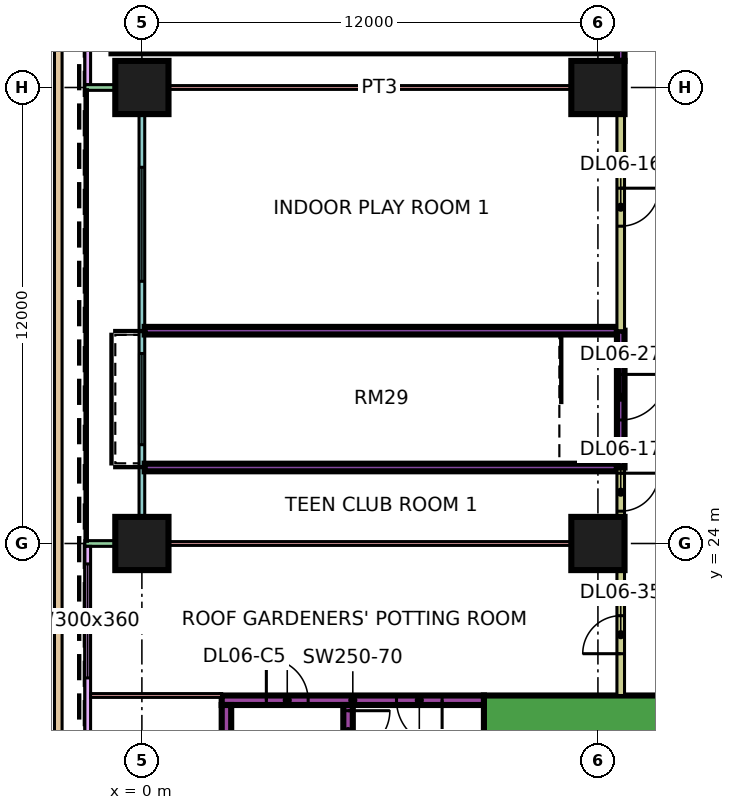
"""IFC4 building model, lengths in metres.
Left out: names, types, materials, properties, quantities, classifications, styles, units other than length and angle.
Written with IfcOpenShell. Run it as: python <this file> out.ifc"""

import sys

from ifc_helpers import new_model, si_unit, direction, frame, frame_2d, origin, origin_2d, place, context, subcontext, project, spatial, rectangle, extrude, element, fill, save


model = new_model("IFC4")
c1 = context("Model", 3, precision=1e-05, world=origin(), true_north=direction((0.0, 1.0)))
c2 = subcontext(c1, "Body", "Model", "MODEL_VIEW")
j1 = project(units=[si_unit("LENGTHUNIT", "METRE"), si_unit("PLANEANGLEUNIT", "RADIAN")], contexts=[c1])
p1 = place(None, origin())
s1 = spatial("IfcSite", under=j1, at=p1, CompositionType="ELEMENT")
p2 = place(p1, origin())
s2 = spatial("IfcBuilding", under=s1, at=p2, CompositionType="ELEMENT")
p3 = place(p2, frame((0.0, 0.0, 35.4)))
s3 = spatial("IfcBuildingStorey", under=s2, at=p3, CompositionType="ELEMENT", Elevation=35.4)
p4 = place(p3, frame((0.0, 24.0, 0.0), z_axis=(0.0, 0.0, 1.0), x_axis=(1.0, 0.0, 0.0)))
e1 = element("IfcColumn", 1, at=p4, inside=s3, PredefinedType="COLUMN", context=c2, shape_type="SweptSolid", body=[
    extrude(rectangle(XDim=1.4, YDim=1.4, at=origin_2d()), origin(), (0.0, 0.0, 1.0), 6.0),
])
p5 = place(p3, frame((0.0, 36.0, 0.0), z_axis=(0.0, 0.0, 1.0), x_axis=(1.0, 0.0, 0.0)))
e2 = element("IfcColumn", 2, at=p5, inside=s3, PredefinedType="COLUMN", context=c2, shape_type="SweptSolid", body=[
    extrude(rectangle(XDim=1.4, YDim=1.4, at=origin_2d()), origin(), (0.0, 0.0, 1.0), 6.0),
])
for number, where, z_axis, x_axis in (
    (3, (12.0, 24.0, 0.0), (0.0, 0.0, 1.0), (1.0, 0.0, 0.0)),
    (4, (12.0, 36.0, 0.0), (0.0, 0.0, 1.0), (1.0, 0.0, 0.0)),
):
    element("IfcColumn", number, at=place(p3, frame(where, z_axis=z_axis, x_axis=x_axis)), inside=s3, PredefinedType="COLUMN", context=c2, shape_type="SweptSolid", body=[
        extrude(rectangle(XDim=1.4, YDim=1.4, at=origin_2d()), origin(), (0.0, 0.0, 1.0), 6.0),
    ])
p6 = place(p3, frame((9.0, 19.4, 0.0), z_axis=(0.0, 0.0, 1.0), x_axis=(1.0, 0.0, 0.0)))
e5 = element("IfcWall", 5, at=p6, inside=s3, PredefinedType="SHEAR", context=c2, shape_type="SweptSolid", body=[
    extrude(rectangle(XDim=25.0, YDim=1.2, at=frame_2d((12.5, 0.0))), origin(), (0.0, 0.0, 1.0), 6.0),
])
p7 = place(p6, frame((19.1, 0.0, 0.0)))
e6 = element("IfcOpeningElement", 6, at=p7, cuts=e5, PredefinedType="OPENING", context=c2, shape_type="SweptSolid", body=[
    extrude(rectangle(XDim=1.8, YDim=2.4, at=frame_2d((0.9, 1.2))), frame((0.0, 0.61, 0.0), z_axis=(0.0, -1.0, 0.0), x_axis=(1.0, 0.0, 0.0)), (0.0, 0.0, 1.0), 1.22),
])
p8 = place(p3, frame((2.1, 19.875, 0.0), z_axis=(0.0, 0.0, 1.0), x_axis=(1.0, 0.0, 0.0)))
e7 = element("IfcWall", 7, at=p8, inside=s3, PredefinedType="SHEAR", context=c2, shape_type="SweptSolid", body=[
    extrude(rectangle(XDim=6.9, YDim=0.25, at=frame_2d((3.45, 0.0))), origin(), (0.0, 0.0, 1.0), 6.0),
])
p9 = place(p8, frame((1.175, 0.0, 0.0)))
e8 = element("IfcOpeningElement", 8, at=p9, cuts=e7, PredefinedType="OPENING", context=c2, shape_type="SweptSolid", body=[
    extrude(rectangle(XDim=1.1, YDim=2.2, at=frame_2d((0.55, 1.1))), frame((0.0, 0.135, 0.0), z_axis=(0.0, -1.0, 0.0), x_axis=(1.0, 0.0, 0.0)), (0.0, 0.0, 1.0), 0.27),
])
p10 = place(p8, frame((4.6, 0.0, 0.0)))
e9 = element("IfcOpeningElement", 9, at=p10, cuts=e7, PredefinedType="OPENING", context=c2, shape_type="SweptSolid", body=[
    extrude(rectangle(XDim=1.2, YDim=2.2, at=frame_2d((0.6, 1.1))), frame((0.0, 0.135, 0.0), z_axis=(0.0, -1.0, 0.0), x_axis=(1.0, 0.0, 0.0)), (0.0, 0.0, 1.0), 0.27),
])
p11 = place(p3, frame((2.225, 13.25, 0.0), z_axis=(0.0, 0.0, 1.0), x_axis=(0.0, 1.0, 0.0)))
e10 = element("IfcWall", 10, at=p11, inside=s3, PredefinedType="SHEAR", context=c2, shape_type="SweptSolid", body=[
    extrude(rectangle(XDim=6.5, YDim=0.25, at=frame_2d((3.25, 0.0))), origin(), (0.0, 0.0, 1.0), 6.0),
])
p12 = place(p3, frame((5.425, 13.25, 0.0), z_axis=(0.0, 0.0, 1.0), x_axis=(0.0, 1.0, 0.0)))
e11 = element("IfcWall", 11, at=p12, inside=s3, PredefinedType="SHEAR", context=c2, shape_type="SweptSolid", body=[
    extrude(rectangle(XDim=6.5, YDim=0.25, at=frame_2d((3.25, 0.0))), origin(), (0.0, 0.0, 1.0), 6.0),
])
p13 = place(p12, frame((5.25, 0.0, 0.0)))
e12 = element("IfcOpeningElement", 12, at=p13, cuts=e11, PredefinedType="OPENING", context=c2, shape_type="SweptSolid", body=[
    extrude(rectangle(XDim=1.1, YDim=2.2, at=frame_2d((0.55, 1.1))), frame((0.0, 0.135, 0.0), z_axis=(0.0, -1.0, 0.0), x_axis=(1.0, 0.0, 0.0)), (0.0, 0.0, 1.0), 0.27),
])
p14 = place(p3, frame((-1.425, 47.925, 0.0), z_axis=(0.0, 0.0, 1.0), x_axis=(0.0, -1.0, 0.0)))
e13 = element("IfcWall", 13, at=p14, inside=s3, PredefinedType="SOLIDWALL", context=c2, shape_type="SweptSolid", body=[
    extrude(rectangle(XDim=11.85, YDim=0.15, at=frame_2d((5.925, 0.0))), origin(), (0.0, 0.0, 1.0), 5.6),
])
p15 = place(p14, frame((0.562, 0.0, 0.45)))
e14 = element("IfcOpeningElement", 14, at=p15, cuts=e13, PredefinedType="OPENING", context=c2, shape_type="SweptSolid", body=[
    extrude(rectangle(XDim=1.8, YDim=3.6, at=frame_2d((0.9, 1.8))), frame((0.0, 0.085, 0.0), z_axis=(0.0, -1.0, 0.0), x_axis=(1.0, 0.0, 0.0)), (0.0, 0.0, 1.0), 0.17),
])
p16 = place(p14, frame((5.05, 0.0, 0.0)))
e15 = element("IfcOpeningElement", 15, at=p16, cuts=e13, PredefinedType="OPENING", context=c2, shape_type="SweptSolid", body=[
    extrude(rectangle(XDim=1.8, YDim=2.4, at=frame_2d((0.9, 1.2))), frame((0.0, 0.085, 0.0), z_axis=(0.0, -1.0, 0.0), x_axis=(1.0, 0.0, 0.0)), (0.0, 0.0, 1.0), 0.17),
])
p17 = place(p3, frame((0.0, 35.925, 0.0), z_axis=(0.0, 0.0, 1.0), x_axis=(0.0, -1.0, 0.0)))
e16 = element("IfcWall", 16, at=p17, inside=s3, PredefinedType="SOLIDWALL", context=c2, shape_type="SweptSolid", body=[
    extrude(rectangle(XDim=11.85, YDim=0.15, at=frame_2d((5.925, 0.0))), origin(), (0.0, 0.0, 1.0), 5.6),
])
p18 = place(p17, frame((2.025, 0.0, 0.45)))
e17 = element("IfcOpeningElement", 17, at=p18, cuts=e16, PredefinedType="OPENING", context=c2, shape_type="SweptSolid", body=[
    extrude(rectangle(XDim=3.0, YDim=3.6, at=frame_2d((1.5, 1.8))), frame((0.0, 0.085, 0.0), z_axis=(0.0, -1.0, 0.0), x_axis=(1.0, 0.0, 0.0)), (0.0, 0.0, 1.0), 0.17),
])
p19 = place(p17, frame((6.925, 0.0, 0.45)))
e18 = element("IfcOpeningElement", 18, at=p19, cuts=e16, PredefinedType="OPENING", context=c2, shape_type="SweptSolid", body=[
    extrude(rectangle(XDim=2.4, YDim=3.6, at=frame_2d((1.2, 1.8))), frame((0.0, 0.085, 0.0), z_axis=(0.0, -1.0, 0.0), x_axis=(1.0, 0.0, 0.0)), (0.0, 0.0, 1.0), 0.17),
])
for number, where, z_axis, x_axis in (
    (19, (-1.5, 36.0, 0.0), (0.0, 0.0, 1.0), (1.0, 0.0, 0.0)),
    (20, (-1.5, 24.0, 0.0), (0.0, 0.0, 1.0), (1.0, 0.0, 0.0)),
):
    element("IfcWall", number, at=place(p3, frame(where, z_axis=z_axis, x_axis=x_axis)), inside=s3, PredefinedType="SOLIDWALL", context=c2, shape_type="SweptSolid", body=[
        extrude(rectangle(XDim=1.5, YDim=0.15, at=frame_2d((0.75, 0.0))), origin(), (0.0, 0.0, 1.0), 5.6),
    ])
p20 = place(p3, frame((-1.425, 23.925, 0.0), z_axis=(0.0, 0.0, 1.0), x_axis=(0.0, -1.0, 0.0)))
e21 = element("IfcWall", 21, at=p20, inside=s3, PredefinedType="SOLIDWALL", context=c2, shape_type="SweptSolid", body=[
    extrude(rectangle(XDim=11.425, YDim=0.15, at=frame_2d((5.712, 0.0))), origin(), (0.0, 0.0, 1.0), 5.6),
])
p21 = place(p20, frame((0.462, 0.0, 0.45)))
e22 = element("IfcOpeningElement", 22, at=p21, cuts=e21, PredefinedType="OPENING", context=c2, shape_type="SweptSolid", body=[
    extrude(rectangle(XDim=3.0, YDim=3.6, at=frame_2d((1.5, 1.8))), frame((0.0, 0.085, 0.0), z_axis=(0.0, -1.0, 0.0), x_axis=(1.0, 0.0, 0.0)), (0.0, 0.0, 1.0), 0.17),
])
p22 = place(p20, frame((6.175, 0.0, 0.45)))
e23 = element("IfcOpeningElement", 23, at=p22, cuts=e21, PredefinedType="OPENING", context=c2, shape_type="SweptSolid", body=[
    extrude(rectangle(XDim=3.0, YDim=3.6, at=frame_2d((1.5, 1.8))), frame((0.0, 0.085, 0.0), z_axis=(0.0, -1.0, 0.0), x_axis=(1.0, 0.0, 0.0)), (0.0, 0.0, 1.0), 0.17),
])
p23 = place(p3, frame((-2.2, 12.21, 0.0), z_axis=(0.0, 0.0, 1.0), x_axis=(0.0, 1.0, 0.0)))
e24 = element("IfcWall", 24, at=p23, inside=s3, PredefinedType="PARAPET", context=c2, shape_type="SweptSolid", body=[
    extrude(rectangle(XDim=49.58, YDim=0.2, at=frame_2d((24.79, 0.0))), origin(), (0.0, 0.0, 1.0), 0.5),
])
p24 = place(p3, frame((-1.351, 20.0, 0.0), z_axis=(0.0, 0.0, 1.0), x_axis=(1.0, 0.0, 0.0)))
e25 = element("IfcWall", 25, at=p24, inside=s3, PredefinedType="PARTITIONING", context=c2, shape_type="SweptSolid", body=[
    extrude(rectangle(XDim=3.451, YDim=0.1, at=frame_2d((1.726, 0.0))), origin(), (0.0, 0.0, 1.0), 5.6),
])
p25 = place(p3, frame((-0.8, 37.0, 0.0), z_axis=(0.0, 0.0, 1.0), x_axis=(1.0, 0.0, 0.0)))
e26 = element("IfcWall", 26, at=p25, inside=s3, PredefinedType="SOLIDWALL", context=c2, shape_type="SweptSolid", body=[
    extrude(rectangle(XDim=13.3, YDim=0.2, at=frame_2d((6.65, 0.0))), origin(), (0.0, 0.0, 1.0), 5.6),
])
e27 = element("IfcWall", 27, at=p4, inside=s3, PredefinedType="PARTITIONING", context=c2, shape_type="SweptSolid", body=[
    extrude(rectangle(XDim=12.5, YDim=0.1, at=frame_2d((6.25, 0.0))), origin(), (0.0, 0.0, 1.0), 5.6),
])
e28 = element("IfcWall", 28, at=p5, inside=s3, PredefinedType="PARTITIONING", context=c2, shape_type="SweptSolid", body=[
    extrude(rectangle(XDim=12.5, YDim=0.1, at=frame_2d((6.25, 0.0))), origin(), (0.0, 0.0, 1.0), 5.6),
])
for number, where, z_axis, x_axis in (
    (29, (0.074, 26.0, 0.0), (0.0, 0.0, 1.0), (1.0, 0.0, 0.0)),
    (30, (0.074, 29.6, 0.0), (0.0, 0.0, 1.0), (1.0, 0.0, 0.0)),
):
    element("IfcWall", number, at=place(p3, frame(where, z_axis=z_axis, x_axis=x_axis)), inside=s3, PredefinedType="SOLIDWALL", context=c2, shape_type="SweptSolid", body=[
        extrude(rectangle(XDim=12.426, YDim=0.2, at=frame_2d((6.213, 0.0))), origin(), (0.0, 0.0, 1.0), 5.6),
    ])
p26 = place(p3, frame((12.6, 20.0, 0.0), z_axis=(0.0, 0.0, 1.0), x_axis=(0.0, 1.0, 0.0)))
e31 = element("IfcWall", 31, at=p26, inside=s3, PredefinedType="PARTITIONING", context=c2, shape_type="SweptSolid", body=[
    extrude(rectangle(XDim=6.0, YDim=0.2, at=frame_2d((3.0, 0.0))), origin(), (0.0, 0.0, 1.0), 5.6),
])
p27 = place(p26, frame((4.85, 0.0, 0.0)))
e32 = element("IfcOpeningElement", 32, at=p27, cuts=e31, PredefinedType="OPENING", context=c2, shape_type="SweptSolid", body=[
    extrude(rectangle(XDim=1.0, YDim=2.1, at=frame_2d((0.5, 1.05))), frame((0.0, 0.11, 0.0), z_axis=(0.0, -1.0, 0.0), x_axis=(1.0, 0.0, 0.0)), (0.0, 0.0, 1.0), 0.22),
])
p28 = place(p26, frame((1.1, 0.0, 0.0)))
e33 = element("IfcOpeningElement", 33, at=p28, cuts=e31, PredefinedType="OPENING", context=c2, shape_type="SweptSolid", body=[
    extrude(rectangle(XDim=1.0, YDim=2.1, at=frame_2d((0.5, 1.05))), frame((0.0, 0.11, 0.0), z_axis=(0.0, -1.0, 0.0), x_axis=(1.0, 0.0, 0.0)), (0.0, 0.0, 1.0), 0.22),
])
p29 = place(p3, frame((12.6, 26.0, 0.0), z_axis=(0.0, 0.0, 1.0), x_axis=(0.0, 1.0, 0.0)))
e34 = element("IfcWall", 34, at=p29, inside=s3, PredefinedType="SOLIDWALL", context=c2, shape_type="SweptSolid", body=[
    extrude(rectangle(XDim=3.6, YDim=0.2, at=frame_2d((1.8, 0.0))), origin(), (0.0, 0.0, 1.0), 5.6),
])
p30 = place(p29, frame((1.25, 0.0, 0.0)))
e35 = element("IfcOpeningElement", 35, at=p30, cuts=e34, PredefinedType="OPENING", context=c2, shape_type="SweptSolid", body=[
    extrude(rectangle(XDim=1.2, YDim=2.1, at=frame_2d((0.6, 1.05))), frame((0.0, 0.11, 0.0), z_axis=(0.0, -1.0, 0.0), x_axis=(1.0, 0.0, 0.0)), (0.0, 0.0, 1.0), 0.22),
])
p31 = place(p3, frame((12.6, 29.6, 0.0), z_axis=(0.0, 0.0, 1.0), x_axis=(0.0, 1.0, 0.0)))
e36 = element("IfcWall", 36, at=p31, inside=s3, PredefinedType="PARTITIONING", context=c2, shape_type="SweptSolid", body=[
    extrude(rectangle(XDim=7.1, YDim=0.2, at=frame_2d((3.55, 0.0))), origin(), (0.0, 0.0, 1.0), 5.6),
])
p32 = place(p31, frame((2.75, 0.0, 0.0)))
e37 = element("IfcOpeningElement", 37, at=p32, cuts=e36, PredefinedType="OPENING", context=c2, shape_type="SweptSolid", body=[
    extrude(rectangle(XDim=1.0, YDim=2.1, at=frame_2d((0.5, 1.05))), frame((0.0, 0.11, 0.0), z_axis=(0.0, -1.0, 0.0), x_axis=(1.0, 0.0, 0.0)), (0.0, 0.0, 1.0), 0.22),
])
p33 = place(p3, frame((12.6, 36.7, 0.0), z_axis=(0.0, 0.0, 1.0), x_axis=(0.0, 1.0, 0.0)))
e38 = element("IfcWall", 38, at=p33, inside=s3, PredefinedType="SOLIDWALL", context=c2, shape_type="SweptSolid", body=[
    extrude(rectangle(XDim=3.9, YDim=0.2, at=frame_2d((1.95, 0.0))), origin(), (0.0, 0.0, 1.0), 5.6),
])
p34 = place(p33, frame((1.55, 0.0, 0.0)))
e39 = element("IfcOpeningElement", 39, at=p34, cuts=e38, PredefinedType="OPENING", context=c2, shape_type="SweptSolid", body=[
    extrude(rectangle(XDim=1.2, YDim=2.1, at=frame_2d((0.6, 1.05))), frame((0.0, 0.11, 0.0), z_axis=(0.0, -1.0, 0.0), x_axis=(1.0, 0.0, 0.0)), (0.0, 0.0, 1.0), 0.22),
])
p35 = place(p18, origin())
e40 = element("IfcWindow", 40, at=p35, inside=s3, PartitioningType="SINGLE_PANEL", PredefinedType="WINDOW", context=c2, shape_type="SweptSolid", body=[
    extrude(rectangle(XDim=3.0, YDim=3.6, at=frame_2d((1.5, 1.8))), frame((0.0, 0.03, 0.0), z_axis=(0.0, -1.0, 0.0), x_axis=(1.0, 0.0, 0.0)), (0.0, 0.0, 1.0), 0.06),
])
fill(e17, e40)
p36 = place(p19, origin())
e41 = element("IfcWindow", 41, at=p36, inside=s3, PartitioningType="SINGLE_PANEL", PredefinedType="WINDOW", context=c2, shape_type="SweptSolid", body=[
    extrude(rectangle(XDim=2.4, YDim=3.6, at=frame_2d((1.2, 1.8))), frame((0.0, 0.03, 0.0), z_axis=(0.0, -1.0, 0.0), x_axis=(1.0, 0.0, 0.0)), (0.0, 0.0, 1.0), 0.06),
])
fill(e18, e41)
p37 = place(p21, origin())
e42 = element("IfcWindow", 42, at=p37, inside=s3, PartitioningType="SINGLE_PANEL", PredefinedType="WINDOW", context=c2, shape_type="SweptSolid", body=[
    extrude(rectangle(XDim=3.0, YDim=3.6, at=frame_2d((1.5, 1.8))), frame((0.0, 0.03, 0.0), z_axis=(0.0, -1.0, 0.0), x_axis=(1.0, 0.0, 0.0)), (0.0, 0.0, 1.0), 0.06),
])
fill(e22, e42)
p38 = place(p13, origin())
e43 = element("IfcDoor", 43, at=p38, inside=s3, OperationType="SINGLE_SWING_RIGHT", PredefinedType="DOOR", context=c2, shape_type="SweptSolid", body=[
    extrude(rectangle(XDim=1.1, YDim=2.2, at=frame_2d((0.55, 1.1))), frame((0.0, 0.025, 0.0), z_axis=(0.0, -1.0, 0.0), x_axis=(1.0, 0.0, 0.0)), (0.0, 0.0, 1.0), 0.05),
])
fill(e12, e43)
p39 = place(p9, origin())
e44 = element("IfcDoor", 44, at=p39, inside=s3, OperationType="SINGLE_SWING_LEFT", PredefinedType="DOOR", context=c2, shape_type="SweptSolid", body=[
    extrude(rectangle(XDim=1.1, YDim=2.2, at=frame_2d((0.55, 1.1))), frame((0.0, 0.025, 0.0), z_axis=(0.0, -1.0, 0.0), x_axis=(1.0, 0.0, 0.0)), (0.0, 0.0, 1.0), 0.05),
])
fill(e8, e44)
p40 = place(p10, origin())
e45 = element("IfcDoor", 45, at=p40, inside=s3, OperationType="SINGLE_SWING_RIGHT", PredefinedType="DOOR", context=c2, shape_type="SweptSolid", body=[
    extrude(rectangle(XDim=1.2, YDim=2.2, at=frame_2d((0.6, 1.1))), frame((0.0, 0.025, 0.0), z_axis=(0.0, -1.0, 0.0), x_axis=(1.0, 0.0, 0.0)), (0.0, 0.0, 1.0), 0.05),
])
fill(e9, e45)
p41 = place(p32, origin())
e46 = element("IfcDoor", 46, at=p41, inside=s3, OperationType="SINGLE_SWING_RIGHT", PredefinedType="DOOR", context=c2, shape_type="SweptSolid", body=[
    extrude(rectangle(XDim=1.0, YDim=2.1, at=frame_2d((0.5, 1.05))), frame((0.0, 0.025, 0.0), z_axis=(0.0, -1.0, 0.0), x_axis=(1.0, 0.0, 0.0)), (0.0, 0.0, 1.0), 0.05),
])
fill(e37, e46)
p42 = place(p27, origin())
e47 = element("IfcDoor", 47, at=p42, inside=s3, OperationType="SINGLE_SWING_RIGHT", PredefinedType="DOOR", context=c2, shape_type="SweptSolid", body=[
    extrude(rectangle(XDim=1.0, YDim=2.1, at=frame_2d((0.5, 1.05))), frame((0.0, 0.025, 0.0), z_axis=(0.0, -1.0, 0.0), x_axis=(1.0, 0.0, 0.0)), (0.0, 0.0, 1.0), 0.05),
])
fill(e32, e47)
p43 = place(p30, origin())
e48 = element("IfcDoor", 48, at=p43, inside=s3, OperationType="SINGLE_SWING_RIGHT", PredefinedType="DOOR", context=c2, shape_type="SweptSolid", body=[
    extrude(rectangle(XDim=1.2, YDim=2.1, at=frame_2d((0.6, 1.05))), frame((0.0, 0.025, 0.0), z_axis=(0.0, -1.0, 0.0), x_axis=(1.0, 0.0, 0.0)), (0.0, 0.0, 1.0), 0.05),
])
fill(e35, e48)
p44 = place(p28, origin())
e49 = element("IfcDoor", 49, at=p44, inside=s3, OperationType="SINGLE_SWING_LEFT", PredefinedType="DOOR", context=c2, shape_type="SweptSolid", body=[
    extrude(rectangle(XDim=1.0, YDim=2.1, at=frame_2d((0.5, 1.05))), frame((0.0, 0.025, 0.0), z_axis=(0.0, -1.0, 0.0), x_axis=(1.0, 0.0, 0.0)), (0.0, 0.0, 1.0), 0.05),
])
fill(e33, e49)
save(model, sys.argv[1])
